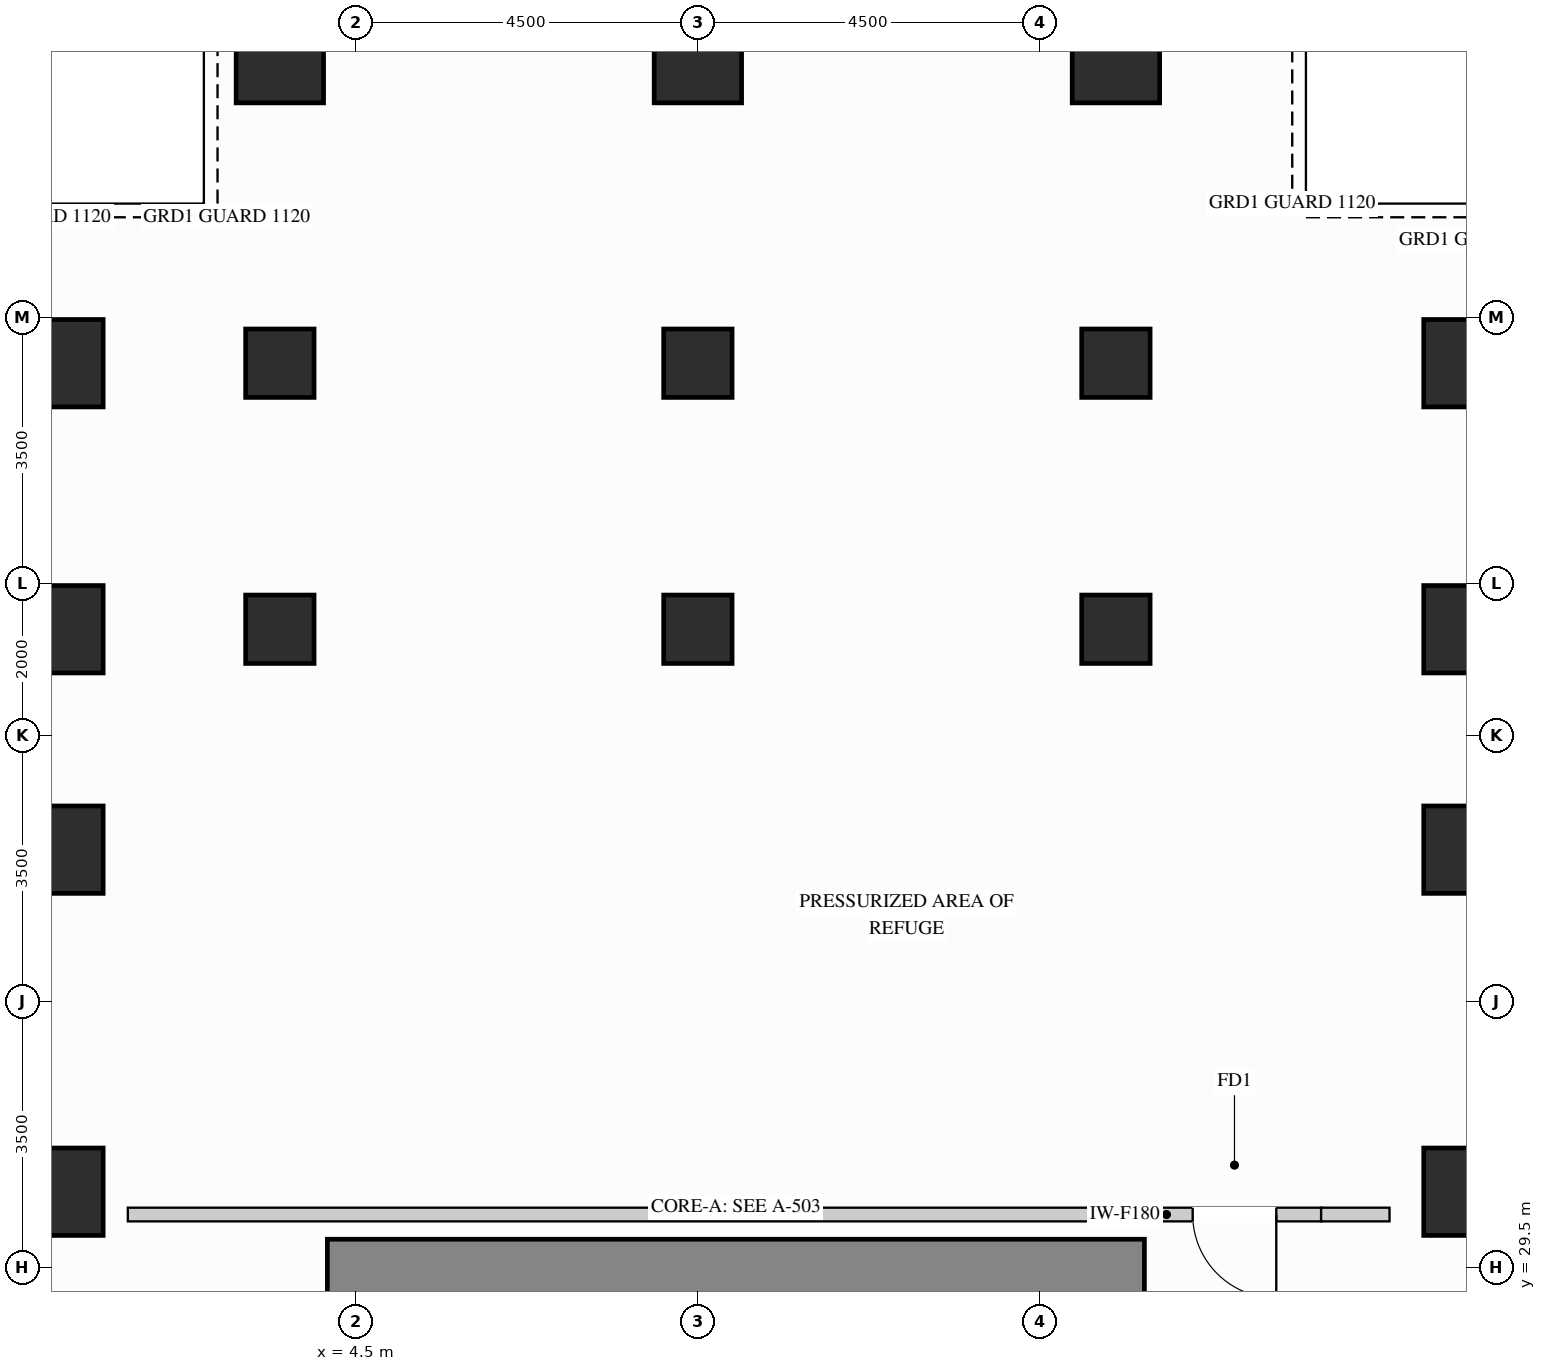
"""IFC4 building model, lengths in metres.
Left out: names, types, materials, properties, quantities, classifications, styles, units other than length and angle.
Written with IfcOpenShell. Run it as: python <this file> out.ifc"""

import sys

from ifc_helpers import new_model, si_unit, direction, frame, frame_2d, origin, origin_2d, place, context, subcontext, project, spatial, rectangle, extrude, source, transform, mapped, element, fill, save


model = new_model("IFC4")
c1 = context("Model", 3, precision=1e-05, world=origin(), true_north=direction((0.0, 1.0)))
c2 = subcontext(c1, "Body", "Model", "MODEL_VIEW")
j1 = project(units=[si_unit("LENGTHUNIT", "METRE"), si_unit("PLANEANGLEUNIT", "RADIAN")], contexts=[c1])
p1 = place(None, origin())
s1 = spatial("IfcSite", under=j1, at=p1, CompositionType="ELEMENT")
p2 = place(p1, origin())
s2 = spatial("IfcBuilding", under=s1, at=p2, CompositionType="ELEMENT")
p3 = place(p2, frame((0.0, 0.0, 138.6)))
s3 = spatial("IfcBuildingStorey", under=s2, at=p3, CompositionType="ELEMENT", Elevation=138.6)
m1 = source(origin(), c2, "Body", "SweptSolid", [
    extrude(rectangle(XDim=0.9, YDim=0.9, at=origin_2d()), origin(), (0.0, 0.0, 1.0), 4.26),
])
for number, where, z_axis, x_axis in (
    (1, (14.5, 37.9, 0.0), (0.0, 0.0, 1.0), (1.0, 0.0, 0.0)),
    (2, (14.5, 41.4, 0.0), (0.0, 0.0, 1.0), (1.0, 0.0, 0.0)),
    (3, (3.5, 37.9, 0.0), (0.0, 0.0, 1.0), (1.0, 0.0, 0.0)),
    (4, (3.5, 41.4, 0.0), (0.0, 0.0, 1.0), (1.0, 0.0, 0.0)),
    (5, (9.0, 37.9, 0.0), (0.0, 0.0, 1.0), (1.0, 0.0, 0.0)),
    (6, (9.0, 41.4, 0.0), (0.0, 0.0, 1.0), (1.0, 0.0, 0.0)),
):
    element("IfcColumn", number, at=place(p3, frame(where, z_axis=z_axis, x_axis=x_axis)), inside=s3, PredefinedType="COLUMN", context=c2, shape_type="MappedRepresentation", body=[
        mapped(m1, transform((0.0, 0.0, 0.0), x_axis=(1.0, 0.0, 0.0), y_axis=(0.0, 1.0, 0.0), z_axis=(0.0, 0.0, 1.0))),
    ])
m2 = source(origin(), c2, "Body", "SweptSolid", [
    extrude(rectangle(XDim=0.9, YDim=1.15, at=origin_2d()), origin(), (0.0, 0.0, 1.0), 4.26),
])
for number, where, z_axis, x_axis in (
    (7, (19.0, 30.5, 0.0), (0.0, 0.0, 1.0), (1.0, 0.0, 0.0)),
    (8, (19.0, 35.0, 0.0), (0.0, 0.0, 1.0), (1.0, 0.0, 0.0)),
    (9, (19.0, 37.9, 0.0), (0.0, 0.0, 1.0), (1.0, 0.0, 0.0)),
    (10, (19.0, 41.4, 0.0), (0.0, 0.0, 1.0), (1.0, 0.0, 0.0)),
):
    element("IfcColumn", number, at=place(p3, frame(where, z_axis=z_axis, x_axis=x_axis)), inside=s3, PredefinedType="COLUMN", context=c2, shape_type="MappedRepresentation", body=[
        mapped(m2, transform((0.0, 0.0, 0.0), x_axis=(1.0, 0.0, 0.0), y_axis=(0.0, 1.0, 0.0), z_axis=(0.0, 0.0, 1.0))),
    ])
m3 = source(origin(), c2, "Body", "SweptSolid", [
    extrude(rectangle(XDim=1.15, YDim=1.15, at=origin_2d()), origin(), (0.0, 0.0, 1.0), 4.26),
])
for number, where, z_axis, x_axis in (
    (11, (14.5, 45.4, 0.0), (0.0, 0.0, 1.0), (1.0, 0.0, 0.0)),
    (12, (3.5, 45.4, 0.0), (0.0, 0.0, 1.0), (1.0, 0.0, 0.0)),
    (13, (9.0, 45.4, 0.0), (0.0, 0.0, 1.0), (1.0, 0.0, 0.0)),
    (14, (0.6, 30.5, 0.0), (0.0, 0.0, 1.0), (1.0, 0.0, 0.0)),
    (15, (0.6, 35.0, 0.0), (0.0, 0.0, 1.0), (1.0, 0.0, 0.0)),
    (16, (0.6, 37.9, 0.0), (0.0, 0.0, 1.0), (1.0, 0.0, 0.0)),
    (17, (0.6, 41.4, 0.0), (0.0, 0.0, 1.0), (1.0, 0.0, 0.0)),
):
    element("IfcColumn", number, at=place(p3, frame(where, z_axis=z_axis, x_axis=x_axis)), inside=s3, PredefinedType="COLUMN", context=c2, shape_type="MappedRepresentation", body=[
        mapped(m3, transform((0.0, 0.0, 0.0), x_axis=(1.0, 0.0, 0.0), y_axis=(0.0, 1.0, 0.0), z_axis=(0.0, 0.0, 1.0))),
    ])
m4 = source(origin(), c2, "Body", "SweptSolid", [
    extrude(rectangle(XDim=10.75, YDim=0.75, at=frame_2d((5.375, 0.0))), origin(), (0.0, 0.0, 1.0), 4.26),
])
p4 = place(p3, frame((4.125, 29.5, 0.0), z_axis=(0.0, 0.0, 1.0), x_axis=(1.0, 0.0, 0.0)))
e18 = element("IfcWall", 18, at=p4, inside=s3, PredefinedType="SHEAR", context=c2, shape_type="MappedRepresentation", body=[
    mapped(m4, transform((0.0, 0.0, 0.0), x_axis=(1.0, 0.0, 0.0), y_axis=(0.0, 1.0, 0.0), z_axis=(0.0, 0.0, 1.0))),
])
p5 = place(p3, frame((14.92, 30.2, 0.0), z_axis=(0.0, 0.0, 1.0), x_axis=(1.0, 0.0, 0.0)))
e19 = element("IfcWall", 19, at=p5, inside=s3, PredefinedType="PARTITIONING", context=c2, shape_type="SweptSolid", body=[
    extrude(rectangle(XDim=2.28, YDim=0.18, at=frame_2d((1.14, 0.0))), origin(), (0.0, 0.0, 1.0), 4.245),
])
p6 = place(p5, frame((0.59, 0.0, 0.0)))
e20 = element("IfcOpeningElement", 20, at=p6, cuts=e19, PredefinedType="OPENING", context=c2, shape_type="SweptSolid", body=[
    extrude(rectangle(XDim=1.1, YDim=2.15, at=frame_2d((0.55, 1.075))), frame((0.0, 0.1, 0.0), z_axis=(0.0, -1.0, 0.0), x_axis=(1.0, 0.0, 0.0)), (0.0, 0.0, 1.0), 0.2),
])
m5 = source(origin(), c2, "Body", "SweptSolid", [
    extrude(rectangle(XDim=13.42, YDim=0.18, at=frame_2d((6.71, 0.0))), origin(), (0.0, 0.0, 1.0), 4.245),
])
p7 = place(p3, frame((1.5, 30.2, 0.0), z_axis=(0.0, 0.0, 1.0), x_axis=(1.0, 0.0, 0.0)))
e21 = element("IfcWall", 21, at=p7, inside=s3, PredefinedType="PARTITIONING", context=c2, shape_type="MappedRepresentation", body=[
    mapped(m5, transform((0.0, 0.0, 0.0), x_axis=(1.0, 0.0, 0.0), y_axis=(0.0, 1.0, 0.0), z_axis=(0.0, 0.0, 1.0))),
])
m6 = source(origin(), c2, "Body", "SweptSolid", [
    extrude(rectangle(XDim=0.9, YDim=0.18, at=frame_2d((0.45, 0.0))), origin(), (0.0, 0.0, 1.0), 4.245),
])
p8 = place(p3, frame((17.2, 30.2, 0.0), z_axis=(0.0, 0.0, 1.0), x_axis=(1.0, 0.0, 0.0)))
e22 = element("IfcWall", 22, at=p8, inside=s3, PredefinedType="PARTITIONING", context=c2, shape_type="MappedRepresentation", body=[
    mapped(m6, transform((0.0, 0.0, 0.0), x_axis=(1.0, 0.0, 0.0), y_axis=(0.0, 1.0, 0.0), z_axis=(0.0, 0.0, 1.0))),
])
m7 = source(origin(), c2, "Body", "SweptSolid", [
    extrude(rectangle(XDim=1.1, YDim=2.15, at=frame_2d((0.55, 1.075))), frame((0.0, 0.025, 0.0), z_axis=(0.0, -1.0, 0.0), x_axis=(1.0, 0.0, 0.0)), (0.0, 0.0, 1.0), 0.05),
])
p9 = place(p6, origin())
e23 = element("IfcDoor", 23, at=p9, inside=s3, OperationType="SINGLE_SWING_RIGHT", PredefinedType="DOOR", context=c2, shape_type="MappedRepresentation", body=[
    mapped(m7, transform((0.0, 0.0, 0.0), x_axis=(1.0, 0.0, 0.0), y_axis=(0.0, 1.0, 0.0), z_axis=(0.0, 0.0, 1.0))),
])
fill(e20, e23)
save(model, sys.argv[1])
